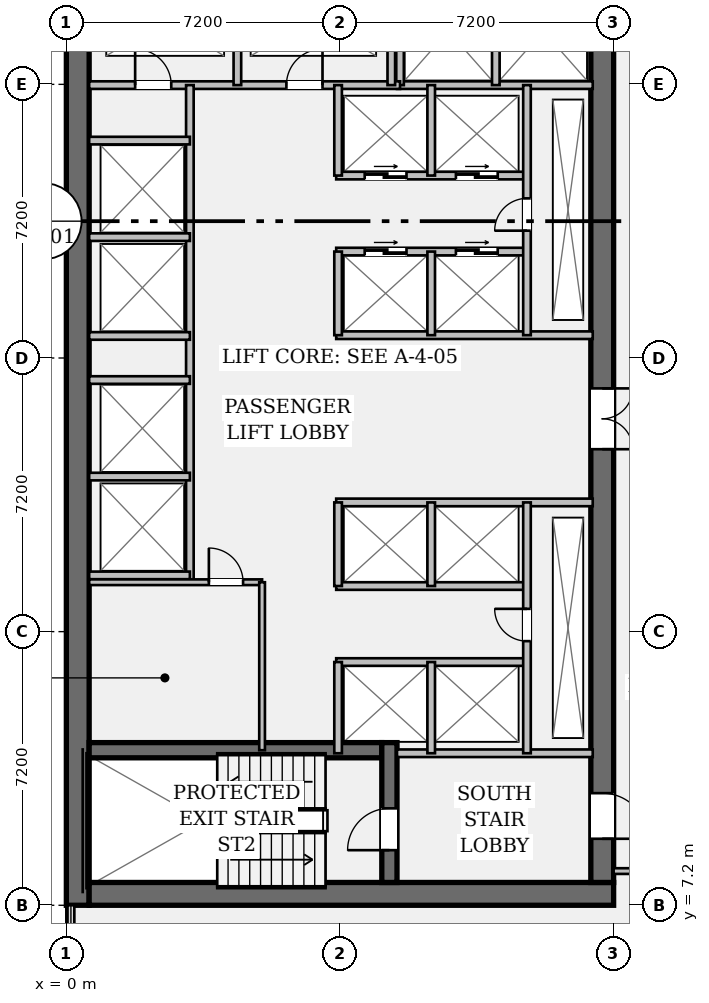
"""IFC4 building model, lengths in metres.
Left out: names, types, materials, properties, quantities, classifications, styles, units other than length and angle.
Written with IfcOpenShell. Run it as: python <this file> out.ifc"""

import sys

from ifc_helpers import new_model, si_unit, direction, frame, frame_2d, origin, place, context, subcontext, project, spatial, rectangle, extrude, element, fill, save


model = new_model("IFC4")
c1 = context("Model", 3, precision=1e-05, world=origin(), true_north=direction((0.0, 1.0)))
c2 = subcontext(c1, "Body", "Model", "MODEL_VIEW")
j1 = project(units=[si_unit("LENGTHUNIT", "METRE"), si_unit("PLANEANGLEUNIT", "RADIAN")], contexts=[c1])
p1 = place(None, origin())
s1 = spatial("IfcSite", under=j1, at=p1, CompositionType="ELEMENT")
p2 = place(p1, origin())
s2 = spatial("IfcBuilding", under=s1, at=p2, CompositionType="ELEMENT")
p3 = place(p2, frame((0.0, 0.0, 85.05)))
s3 = spatial("IfcBuildingStorey", under=s2, at=p3, CompositionType="ELEMENT", Elevation=85.05)
p4 = place(p3, frame((0.3, 7.2, 0.0), z_axis=(0.0, 0.0, 1.0), x_axis=(0.0, 1.0, 0.0)))
e1 = element("IfcWall", 1, at=p4, inside=s3, PredefinedType="SHEAR", context=c2, shape_type="SweptSolid", body=[
    extrude(rectangle(XDim=28.8, YDim=0.6, at=frame_2d((14.4, 0.0))), origin(), (0.0, 0.0, 1.0), 3.57),
])
p5 = place(p3, frame((0.6, 7.5, 0.0), z_axis=(0.0, 0.0, 1.0), x_axis=(1.0, 0.0, 0.0)))
e2 = element("IfcWall", 2, at=p5, inside=s3, PredefinedType="SHEAR", context=c2, shape_type="SweptSolid", body=[
    extrude(rectangle(XDim=13.8, YDim=0.6, at=frame_2d((6.9, 0.0))), origin(), (0.0, 0.0, 1.0), 3.57),
])
p6 = place(p3, frame((14.1, 35.4, 0.0), z_axis=(0.0, 0.0, 1.0), x_axis=(0.0, -1.0, 0.0)))
e3 = element("IfcWall", 3, at=p6, inside=s3, PredefinedType="SHEAR", context=c2, shape_type="SweptSolid", body=[
    extrude(rectangle(XDim=27.6, YDim=0.6, at=frame_2d((13.8, 0.0))), origin(), (0.0, 0.0, 1.0), 3.57),
])
p7 = place(p6, frame((1.3, 0.0, 0.0)))
e4 = element("IfcOpeningElement", 4, at=p7, cuts=e3, PredefinedType="OPENING", context=c2, shape_type="SweptSolid", body=[
    extrude(rectangle(XDim=1.2, YDim=2.15, at=frame_2d((0.6, 1.075))), frame((0.0, 0.312, 0.0), z_axis=(0.0, -1.0, 0.0), x_axis=(1.0, 0.0, 0.0)), (0.0, 0.0, 1.0), 0.624),
])
p8 = place(p6, frame((25.25, 0.0, 0.0)))
e5 = element("IfcOpeningElement", 5, at=p8, cuts=e3, PredefinedType="OPENING", context=c2, shape_type="SweptSolid", body=[
    extrude(rectangle(XDim=1.2, YDim=2.15, at=frame_2d((0.6, 1.075))), frame((0.0, 0.312, 0.0), z_axis=(0.0, -1.0, 0.0), x_axis=(1.0, 0.0, 0.0)), (0.0, 0.0, 1.0), 0.624),
])
p9 = place(p6, frame((14.6, 0.0, 0.0)))
e6 = element("IfcOpeningElement", 6, at=p9, cuts=e3, PredefinedType="OPENING", context=c2, shape_type="SweptSolid", body=[
    extrude(rectangle(XDim=1.6, YDim=2.2, at=frame_2d((0.8, 1.1))), frame((0.0, 0.312, 0.0), z_axis=(0.0, -1.0, 0.0), x_axis=(1.0, 0.0, 0.0)), (0.0, 0.0, 1.0), 0.624),
])
p10 = place(p3, frame((0.6, 11.28, 0.0), z_axis=(0.0, 0.0, 1.0), x_axis=(1.0, 0.0, 0.0)))
e7 = element("IfcWall", 7, at=p10, inside=s3, PredefinedType="SHEAR", context=c2, shape_type="SweptSolid", body=[
    extrude(rectangle(XDim=7.7, YDim=0.4, at=frame_2d((3.85, 0.0))), origin(), (0.0, 0.0, 1.0), 3.57),
])
p11 = place(p3, frame((8.5, 7.8, 0.0), z_axis=(0.0, 0.0, 1.0), x_axis=(0.0, 1.0, 0.0)))
e8 = element("IfcWall", 8, at=p11, inside=s3, PredefinedType="SHEAR", context=c2, shape_type="SweptSolid", body=[
    extrude(rectangle(XDim=3.68, YDim=0.4, at=frame_2d((1.84, 0.0))), origin(), (0.0, 0.0, 1.0), 3.57),
])
p12 = place(p11, frame((0.85, 0.0, 0.0)))
e9 = element("IfcOpeningElement", 9, at=p12, cuts=e8, PredefinedType="OPENING", context=c2, shape_type="SweptSolid", body=[
    extrude(rectangle(XDim=1.1, YDim=2.15, at=frame_2d((0.55, 1.075))), frame((0.0, 0.212, 0.0), z_axis=(0.0, -1.0, 0.0), x_axis=(1.0, 0.0, 0.0)), (0.0, 0.0, 1.0), 0.424),
])
for number, where, z_axis, x_axis in (
    (10, (8.7, 11.2, 0.0), (0.0, 0.0, 1.0), (1.0, 0.0, 0.0)),
    (11, (8.7, 28.78, 0.0), (0.0, 0.0, 1.0), (1.0, 0.0, 0.0)),
):
    element("IfcWall", number, at=place(p3, frame(where, z_axis=z_axis, x_axis=x_axis)), inside=s3, PredefinedType="PARTITIONING", context=c2, shape_type="SweptSolid", body=[
        extrude(rectangle(XDim=5.15, YDim=0.2, at=frame_2d((2.575, 0.0))), origin(), (0.0, 0.0, 1.0), 3.57),
    ])
for number, where, z_axis, x_axis in (
    (12, (8.78, 28.78, 0.0), (0.0, 0.0, 1.0), (0.0, 1.0, 0.0)),
    (13, (11.3, 28.78, 0.0), (0.0, 0.0, 1.0), (0.0, 1.0, 0.0)),
):
    element("IfcWall", number, at=place(p3, frame(where, z_axis=z_axis, x_axis=x_axis)), inside=s3, PredefinedType="PARTITIONING", context=c2, shape_type="SweptSolid", body=[
        extrude(rectangle(XDim=3.1, YDim=0.2, at=frame_2d((1.55, 0.0))), origin(), (0.0, 0.0, 1.0), 3.57),
    ])
p13 = place(p3, frame((0.6, 28.78, 0.0), z_axis=(0.0, 0.0, 1.0), x_axis=(1.0, 0.0, 0.0)))
e14 = element("IfcWall", 14, at=p13, inside=s3, PredefinedType="PARTITIONING", context=c2, shape_type="SweptSolid", body=[
    extrude(rectangle(XDim=8.18, YDim=0.2, at=frame_2d((4.09, 0.0))), origin(), (0.0, 0.0, 1.0), 3.57),
])
p14 = place(p13, frame((1.21, 0.0, 0.0)))
e15 = element("IfcOpeningElement", 15, at=p14, cuts=e14, PredefinedType="OPENING", context=c2, shape_type="SweptSolid", body=[
    extrude(rectangle(XDim=0.95, YDim=2.15, at=frame_2d((0.475, 1.075))), frame((0.0, 0.112, 0.0), z_axis=(0.0, -1.0, 0.0), x_axis=(1.0, 0.0, 0.0)), (0.0, 0.0, 1.0), 0.224),
])
p15 = place(p13, frame((5.19, 0.0, 0.0)))
e16 = element("IfcOpeningElement", 16, at=p15, cuts=e14, PredefinedType="OPENING", context=c2, shape_type="SweptSolid", body=[
    extrude(rectangle(XDim=0.95, YDim=2.15, at=frame_2d((0.475, 1.075))), frame((0.0, 0.112, 0.0), z_axis=(0.0, -1.0, 0.0), x_axis=(1.0, 0.0, 0.0)), (0.0, 0.0, 1.0), 0.224),
])
for number, where, z_axis, x_axis in (
    (17, (4.5, 28.78, 0.0), (0.0, 0.0, 1.0), (0.0, 1.0, 0.0)),
    (18, (8.55, 28.78, 0.0), (0.0, 0.0, 1.0), (0.0, 1.0, 0.0)),
):
    element("IfcWall", number, at=place(p3, frame(where, z_axis=z_axis, x_axis=x_axis)), inside=s3, PredefinedType="PARTITIONING", context=c2, shape_type="SweptSolid", body=[
        extrude(rectangle(XDim=2.94, YDim=0.2, at=frame_2d((1.47, 0.0))), origin(), (0.0, 0.0, 1.0), 3.57),
    ])
p16 = place(p3, frame((3.25, 15.7, 0.0), z_axis=(0.0, 0.0, 1.0), x_axis=(0.0, 1.0, 0.0)))
e19 = element("IfcWall", 19, at=p16, inside=s3, PredefinedType="PARTITIONING", context=c2, shape_type="SweptSolid", body=[
    extrude(rectangle(XDim=13.08, YDim=0.2, at=frame_2d((6.54, 0.0))), origin(), (0.0, 0.0, 1.0), 3.57),
])
for number, where, z_axis, x_axis in (
    (20, (0.6, 15.88, 0.0), (0.0, 0.0, 1.0), (1.0, 0.0, 0.0)),
    (21, (0.6, 18.48, 0.0), (0.0, 0.0, 1.0), (1.0, 0.0, 0.0)),
    (22, (0.6, 22.18, 0.0), (0.0, 0.0, 1.0), (1.0, 0.0, 0.0)),
    (23, (0.6, 24.78, 0.0), (0.0, 0.0, 1.0), (1.0, 0.0, 0.0)),
    (24, (0.6, 21.02, 0.0), (0.0, 0.0, 1.0), (1.0, 0.0, 0.0)),
    (25, (0.6, 27.32, 0.0), (0.0, 0.0, 1.0), (1.0, 0.0, 0.0)),
):
    element("IfcWall", number, at=place(p3, frame(where, z_axis=z_axis, x_axis=x_axis)), inside=s3, PredefinedType="PARTITIONING", context=c2, shape_type="SweptSolid", body=[
        extrude(rectangle(XDim=2.65, YDim=0.2, at=frame_2d((1.325, 0.0))), origin(), (0.0, 0.0, 1.0), 3.57),
    ])
p17 = place(p3, frame((7.1, 22.2, 0.0), z_axis=(0.0, 0.0, 1.0), x_axis=(1.0, 0.0, 0.0)))
e26 = element("IfcWall", 26, at=p17, inside=s3, PredefinedType="PARTITIONING", context=c2, shape_type="SweptSolid", body=[
    extrude(rectangle(XDim=6.75, YDim=0.2, at=frame_2d((3.375, 0.0))), origin(), (0.0, 0.0, 1.0), 3.57),
])
p18 = place(p3, frame((7.1, 24.4, 0.0), z_axis=(0.0, 0.0, 1.0), x_axis=(1.0, 0.0, 0.0)))
e27 = element("IfcWall", 27, at=p18, inside=s3, PredefinedType="PARTITIONING", context=c2, shape_type="SweptSolid", body=[
    extrude(rectangle(XDim=5.02, YDim=0.2, at=frame_2d((2.51, 0.0))), origin(), (0.0, 0.0, 1.0), 3.57),
])
p19 = place(p18, frame((0.75, 0.0, 0.0)))
e28 = element("IfcOpeningElement", 28, at=p19, cuts=e27, PredefinedType="OPENING", context=c2, shape_type="SweptSolid", body=[
    extrude(rectangle(XDim=1.1, YDim=2.2, at=frame_2d((0.55, 1.1))), frame((0.0, 0.112, 0.0), z_axis=(0.0, -1.0, 0.0), x_axis=(1.0, 0.0, 0.0)), (0.0, 0.0, 1.0), 0.224),
])
p20 = place(p18, frame((3.15, 0.0, 0.0)))
e29 = element("IfcOpeningElement", 29, at=p20, cuts=e27, PredefinedType="OPENING", context=c2, shape_type="SweptSolid", body=[
    extrude(rectangle(XDim=1.1, YDim=2.2, at=frame_2d((0.55, 1.1))), frame((0.0, 0.112, 0.0), z_axis=(0.0, -1.0, 0.0), x_axis=(1.0, 0.0, 0.0)), (0.0, 0.0, 1.0), 0.224),
])
p21 = place(p3, frame((7.1, 26.4, 0.0), z_axis=(0.0, 0.0, 1.0), x_axis=(1.0, 0.0, 0.0)))
e30 = element("IfcWall", 30, at=p21, inside=s3, PredefinedType="PARTITIONING", context=c2, shape_type="SweptSolid", body=[
    extrude(rectangle(XDim=5.02, YDim=0.2, at=frame_2d((2.51, 0.0))), origin(), (0.0, 0.0, 1.0), 3.57),
])
p22 = place(p21, frame((0.75, 0.0, 0.0)))
e31 = element("IfcOpeningElement", 31, at=p22, cuts=e30, PredefinedType="OPENING", context=c2, shape_type="SweptSolid", body=[
    extrude(rectangle(XDim=1.1, YDim=2.2, at=frame_2d((0.55, 1.1))), frame((0.0, 0.112, 0.0), z_axis=(0.0, -1.0, 0.0), x_axis=(1.0, 0.0, 0.0)), (0.0, 0.0, 1.0), 0.224),
])
p23 = place(p21, frame((3.15, 0.0, 0.0)))
e32 = element("IfcOpeningElement", 32, at=p23, cuts=e30, PredefinedType="OPENING", context=c2, shape_type="SweptSolid", body=[
    extrude(rectangle(XDim=1.1, YDim=2.2, at=frame_2d((0.55, 1.1))), frame((0.0, 0.112, 0.0), z_axis=(0.0, -1.0, 0.0), x_axis=(1.0, 0.0, 0.0)), (0.0, 0.0, 1.0), 0.224),
])
p24 = place(p3, frame((7.15, 22.2, 0.0), z_axis=(0.0, 0.0, 1.0), x_axis=(0.0, 1.0, 0.0)))
e33 = element("IfcWall", 33, at=p24, inside=s3, PredefinedType="PARTITIONING", context=c2, shape_type="SweptSolid", body=[
    extrude(rectangle(XDim=2.2, YDim=0.2, at=frame_2d((1.1, 0.0))), origin(), (0.0, 0.0, 1.0), 3.57),
])
p25 = place(p3, frame((7.15, 26.4, 0.0), z_axis=(0.0, 0.0, 1.0), x_axis=(0.0, 1.0, 0.0)))
e34 = element("IfcWall", 34, at=p25, inside=s3, PredefinedType="PARTITIONING", context=c2, shape_type="SweptSolid", body=[
    extrude(rectangle(XDim=2.38, YDim=0.2, at=frame_2d((1.19, 0.0))), origin(), (0.0, 0.0, 1.0), 3.57),
])
p26 = place(p3, frame((9.6, 22.2, 0.0), z_axis=(0.0, 0.0, 1.0), x_axis=(0.0, 1.0, 0.0)))
e35 = element("IfcWall", 35, at=p26, inside=s3, PredefinedType="PARTITIONING", context=c2, shape_type="SweptSolid", body=[
    extrude(rectangle(XDim=2.2, YDim=0.2, at=frame_2d((1.1, 0.0))), origin(), (0.0, 0.0, 1.0), 3.57),
])
p27 = place(p3, frame((9.6, 26.4, 0.0), z_axis=(0.0, 0.0, 1.0), x_axis=(0.0, 1.0, 0.0)))
e36 = element("IfcWall", 36, at=p27, inside=s3, PredefinedType="PARTITIONING", context=c2, shape_type="SweptSolid", body=[
    extrude(rectangle(XDim=2.38, YDim=0.2, at=frame_2d((1.19, 0.0))), origin(), (0.0, 0.0, 1.0), 3.57),
])
p28 = place(p3, frame((12.12, 22.2, 0.0), z_axis=(0.0, 0.0, 1.0), x_axis=(0.0, 1.0, 0.0)))
e37 = element("IfcWall", 37, at=p28, inside=s3, PredefinedType="PARTITIONING", context=c2, shape_type="SweptSolid", body=[
    extrude(rectangle(XDim=6.58, YDim=0.2, at=frame_2d((3.29, 0.0))), origin(), (0.0, 0.0, 1.0), 3.57),
])
p29 = place(p28, frame((2.75, 0.0, 0.0)))
e38 = element("IfcOpeningElement", 38, at=p29, cuts=e37, PredefinedType="OPENING", context=c2, shape_type="SweptSolid", body=[
    extrude(rectangle(XDim=0.85, YDim=2.15, at=frame_2d((0.425, 1.075))), frame((0.0, 0.112, 0.0), z_axis=(0.0, -1.0, 0.0), x_axis=(1.0, 0.0, 0.0)), (0.0, 0.0, 1.0), 0.224),
])
p30 = place(p3, frame((7.1, 17.8, 0.0), z_axis=(0.0, 0.0, 1.0), x_axis=(1.0, 0.0, 0.0)))
e39 = element("IfcWall", 39, at=p30, inside=s3, PredefinedType="PARTITIONING", context=c2, shape_type="SweptSolid", body=[
    extrude(rectangle(XDim=6.75, YDim=0.2, at=frame_2d((3.375, 0.0))), origin(), (0.0, 0.0, 1.0), 3.57),
])
for number, where, z_axis, x_axis in (
    (40, (7.1, 15.6, 0.0), (0.0, 0.0, 1.0), (1.0, 0.0, 0.0)),
    (41, (7.1, 13.6, 0.0), (0.0, 0.0, 1.0), (1.0, 0.0, 0.0)),
):
    element("IfcWall", number, at=place(p3, frame(where, z_axis=z_axis, x_axis=x_axis)), inside=s3, PredefinedType="PARTITIONING", context=c2, shape_type="SweptSolid", body=[
        extrude(rectangle(XDim=5.02, YDim=0.2, at=frame_2d((2.51, 0.0))), origin(), (0.0, 0.0, 1.0), 3.57),
    ])
p31 = place(p3, frame((7.15, 15.6, 0.0), z_axis=(0.0, 0.0, 1.0), x_axis=(0.0, 1.0, 0.0)))
e42 = element("IfcWall", 42, at=p31, inside=s3, PredefinedType="PARTITIONING", context=c2, shape_type="SweptSolid", body=[
    extrude(rectangle(XDim=2.2, YDim=0.2, at=frame_2d((1.1, 0.0))), origin(), (0.0, 0.0, 1.0), 3.57),
])
p32 = place(p3, frame((7.15, 11.2, 0.0), z_axis=(0.0, 0.0, 1.0), x_axis=(0.0, 1.0, 0.0)))
e43 = element("IfcWall", 43, at=p32, inside=s3, PredefinedType="PARTITIONING", context=c2, shape_type="SweptSolid", body=[
    extrude(rectangle(XDim=2.4, YDim=0.2, at=frame_2d((1.2, 0.0))), origin(), (0.0, 0.0, 1.0), 3.57),
])
p33 = place(p3, frame((9.6, 15.6, 0.0), z_axis=(0.0, 0.0, 1.0), x_axis=(0.0, 1.0, 0.0)))
e44 = element("IfcWall", 44, at=p33, inside=s3, PredefinedType="PARTITIONING", context=c2, shape_type="SweptSolid", body=[
    extrude(rectangle(XDim=2.2, YDim=0.2, at=frame_2d((1.1, 0.0))), origin(), (0.0, 0.0, 1.0), 3.57),
])
p34 = place(p3, frame((9.6, 11.2, 0.0), z_axis=(0.0, 0.0, 1.0), x_axis=(0.0, 1.0, 0.0)))
e45 = element("IfcWall", 45, at=p34, inside=s3, PredefinedType="PARTITIONING", context=c2, shape_type="SweptSolid", body=[
    extrude(rectangle(XDim=2.4, YDim=0.2, at=frame_2d((1.2, 0.0))), origin(), (0.0, 0.0, 1.0), 3.57),
])
p35 = place(p3, frame((12.12, 11.2, 0.0), z_axis=(0.0, 0.0, 1.0), x_axis=(0.0, 1.0, 0.0)))
e46 = element("IfcWall", 46, at=p35, inside=s3, PredefinedType="PARTITIONING", context=c2, shape_type="SweptSolid", body=[
    extrude(rectangle(XDim=6.6, YDim=0.2, at=frame_2d((3.3, 0.0))), origin(), (0.0, 0.0, 1.0), 3.57),
])
p36 = place(p35, frame((2.95, 0.0, 0.0)))
e47 = element("IfcOpeningElement", 47, at=p36, cuts=e46, PredefinedType="OPENING", context=c2, shape_type="SweptSolid", body=[
    extrude(rectangle(XDim=0.85, YDim=2.15, at=frame_2d((0.425, 1.075))), frame((0.0, 0.112, 0.0), z_axis=(0.0, -1.0, 0.0), x_axis=(1.0, 0.0, 0.0)), (0.0, 0.0, 1.0), 0.224),
])
p37 = place(p3, frame((0.6, 15.7, 0.0), z_axis=(0.0, 0.0, 1.0), x_axis=(1.0, 0.0, 0.0)))
e48 = element("IfcWall", 48, at=p37, inside=s3, PredefinedType="PARTITIONING", context=c2, shape_type="SweptSolid", body=[
    extrude(rectangle(XDim=4.55, YDim=0.15, at=frame_2d((2.275, 0.0))), origin(), (0.0, 0.0, 1.0), 3.57),
])
p38 = place(p37, frame((3.15, 0.0, 0.0)))
e49 = element("IfcOpeningElement", 49, at=p38, cuts=e48, PredefinedType="OPENING", context=c2, shape_type="SweptSolid", body=[
    extrude(rectangle(XDim=0.9, YDim=2.15, at=frame_2d((0.45, 1.075))), frame((0.0, 0.087, 0.0), z_axis=(0.0, -1.0, 0.0), x_axis=(1.0, 0.0, 0.0)), (0.0, 0.0, 1.0), 0.174),
])
p39 = place(p3, frame((5.15, 11.28, 0.0), z_axis=(0.0, 0.0, 1.0), x_axis=(0.0, 1.0, 0.0)))
e50 = element("IfcWall", 50, at=p39, inside=s3, PredefinedType="PARTITIONING", context=c2, shape_type="SweptSolid", body=[
    extrude(rectangle(XDim=4.42, YDim=0.15, at=frame_2d((2.21, 0.0))), origin(), (0.0, 0.0, 1.0), 3.57),
])
p40 = place(p3, frame((14.4, 8.1, 0.0), z_axis=(0.0, 0.0, 1.0), x_axis=(1.0, 0.0, 0.0)))
e51 = element("IfcWall", 51, at=p40, inside=s3, PredefinedType="PARTITIONING", context=c2, shape_type="SweptSolid", body=[
    extrude(rectangle(XDim=2.95, YDim=0.15, at=frame_2d((1.475, 0.0))), origin(), (0.0, 0.0, 1.0), 3.088),
])
p41 = place(p40, frame((0.95, 0.0, 0.0)))
e52 = element("IfcOpeningElement", 52, at=p41, cuts=e51, PredefinedType="OPENING", context=c2, shape_type="SweptSolid", body=[
    extrude(rectangle(XDim=0.95, YDim=2.15, at=frame_2d((0.475, 1.075))), frame((0.0, 0.087, 0.0), z_axis=(0.0, -1.0, 0.0), x_axis=(1.0, 0.0, 0.0)), (0.0, 0.0, 1.0), 0.174),
])
p42 = place(p12, origin())
e53 = element("IfcDoor", 53, at=p42, inside=s3, OperationType="SINGLE_SWING_LEFT", PredefinedType="DOOR", context=c2, shape_type="SweptSolid", body=[
    extrude(rectangle(XDim=1.1, YDim=2.15, at=frame_2d((0.55, 1.075))), frame((0.0, 0.025, 0.0), z_axis=(0.0, -1.0, 0.0), x_axis=(1.0, 0.0, 0.0)), (0.0, 0.0, 1.0), 0.05),
])
fill(e9, e53)
p43 = place(p8, origin())
e54 = element("IfcDoor", 54, at=p43, inside=s3, OperationType="SINGLE_SWING_RIGHT", PredefinedType="DOOR", context=c2, shape_type="SweptSolid", body=[
    extrude(rectangle(XDim=1.2, YDim=2.15, at=frame_2d((0.6, 1.075))), frame((0.0, 0.025, 0.0), z_axis=(0.0, -1.0, 0.0), x_axis=(1.0, 0.0, 0.0)), (0.0, 0.0, 1.0), 0.05),
])
fill(e5, e54)
p44 = place(p14, origin())
e55 = element("IfcDoor", 55, at=p44, inside=s3, OperationType="SINGLE_SWING_LEFT", PredefinedType="DOOR", context=c2, shape_type="SweptSolid", body=[
    extrude(rectangle(XDim=0.95, YDim=2.15, at=frame_2d((0.475, 1.075))), frame((0.0, 0.025, 0.0), z_axis=(0.0, -1.0, 0.0), x_axis=(1.0, 0.0, 0.0)), (0.0, 0.0, 1.0), 0.05),
])
fill(e15, e55)
p45 = place(p15, origin())
e56 = element("IfcDoor", 56, at=p45, inside=s3, OperationType="SINGLE_SWING_RIGHT", PredefinedType="DOOR", context=c2, shape_type="SweptSolid", body=[
    extrude(rectangle(XDim=0.95, YDim=2.15, at=frame_2d((0.475, 1.075))), frame((0.0, 0.025, 0.0), z_axis=(0.0, -1.0, 0.0), x_axis=(1.0, 0.0, 0.0)), (0.0, 0.0, 1.0), 0.05),
])
fill(e16, e56)
p46 = place(p9, origin())
e57 = element("IfcDoor", 57, at=p46, inside=s3, OperationType="DOUBLE_DOOR_SINGLE_SWING", PredefinedType="DOOR", context=c2, shape_type="SweptSolid", body=[
    extrude(rectangle(XDim=1.6, YDim=2.2, at=frame_2d((0.8, 1.1))), frame((0.0, 0.025, 0.0), z_axis=(0.0, -1.0, 0.0), x_axis=(1.0, 0.0, 0.0)), (0.0, 0.0, 1.0), 0.05),
])
fill(e6, e57)
p47 = place(p29, origin())
e58 = element("IfcDoor", 58, at=p47, inside=s3, OperationType="SINGLE_SWING_LEFT", PredefinedType="DOOR", context=c2, shape_type="SweptSolid", body=[
    extrude(rectangle(XDim=0.85, YDim=2.15, at=frame_2d((0.425, 1.075))), frame((0.0, 0.025, 0.0), z_axis=(0.0, -1.0, 0.0), x_axis=(1.0, 0.0, 0.0)), (0.0, 0.0, 1.0), 0.05),
])
fill(e38, e58)
p48 = place(p19, origin())
e59 = element("IfcDoor", 59, at=p48, inside=s3, OperationType="DOUBLE_DOOR_SLIDING", PredefinedType="DOOR", context=c2, shape_type="SweptSolid", body=[
    extrude(rectangle(XDim=1.1, YDim=2.2, at=frame_2d((0.55, 1.1))), frame((0.0, 0.025, 0.0), z_axis=(0.0, -1.0, 0.0), x_axis=(1.0, 0.0, 0.0)), (0.0, 0.0, 1.0), 0.05),
])
fill(e28, e59)
p49 = place(p20, origin())
e60 = element("IfcDoor", 60, at=p49, inside=s3, OperationType="DOUBLE_DOOR_SLIDING", PredefinedType="DOOR", context=c2, shape_type="SweptSolid", body=[
    extrude(rectangle(XDim=1.1, YDim=2.2, at=frame_2d((0.55, 1.1))), frame((0.0, 0.025, 0.0), z_axis=(0.0, -1.0, 0.0), x_axis=(1.0, 0.0, 0.0)), (0.0, 0.0, 1.0), 0.05),
])
fill(e29, e60)
p50 = place(p22, origin())
e61 = element("IfcDoor", 61, at=p50, inside=s3, OperationType="DOUBLE_DOOR_SLIDING", PredefinedType="DOOR", context=c2, shape_type="SweptSolid", body=[
    extrude(rectangle(XDim=1.1, YDim=2.2, at=frame_2d((0.55, 1.1))), frame((0.0, 0.025, 0.0), z_axis=(0.0, -1.0, 0.0), x_axis=(1.0, 0.0, 0.0)), (0.0, 0.0, 1.0), 0.05),
])
fill(e31, e61)
p51 = place(p23, origin())
e62 = element("IfcDoor", 62, at=p51, inside=s3, OperationType="DOUBLE_DOOR_SLIDING", PredefinedType="DOOR", context=c2, shape_type="SweptSolid", body=[
    extrude(rectangle(XDim=1.1, YDim=2.2, at=frame_2d((0.55, 1.1))), frame((0.0, 0.025, 0.0), z_axis=(0.0, -1.0, 0.0), x_axis=(1.0, 0.0, 0.0)), (0.0, 0.0, 1.0), 0.05),
])
fill(e32, e62)
p52 = place(p36, origin())
e63 = element("IfcDoor", 63, at=p52, inside=s3, OperationType="SINGLE_SWING_RIGHT", PredefinedType="DOOR", context=c2, shape_type="SweptSolid", body=[
    extrude(rectangle(XDim=0.85, YDim=2.15, at=frame_2d((0.425, 1.075))), frame((0.0, 0.025, 0.0), z_axis=(0.0, -1.0, 0.0), x_axis=(1.0, 0.0, 0.0)), (0.0, 0.0, 1.0), 0.05),
])
fill(e47, e63)
p53 = place(p38, origin())
e64 = element("IfcDoor", 64, at=p53, inside=s3, OperationType="SINGLE_SWING_LEFT", PredefinedType="DOOR", context=c2, shape_type="SweptSolid", body=[
    extrude(rectangle(XDim=0.9, YDim=2.15, at=frame_2d((0.45, 1.075))), frame((0.0, 0.025, 0.0), z_axis=(0.0, -1.0, 0.0), x_axis=(1.0, 0.0, 0.0)), (0.0, 0.0, 1.0), 0.05),
])
fill(e49, e64)
save(model, sys.argv[1])
